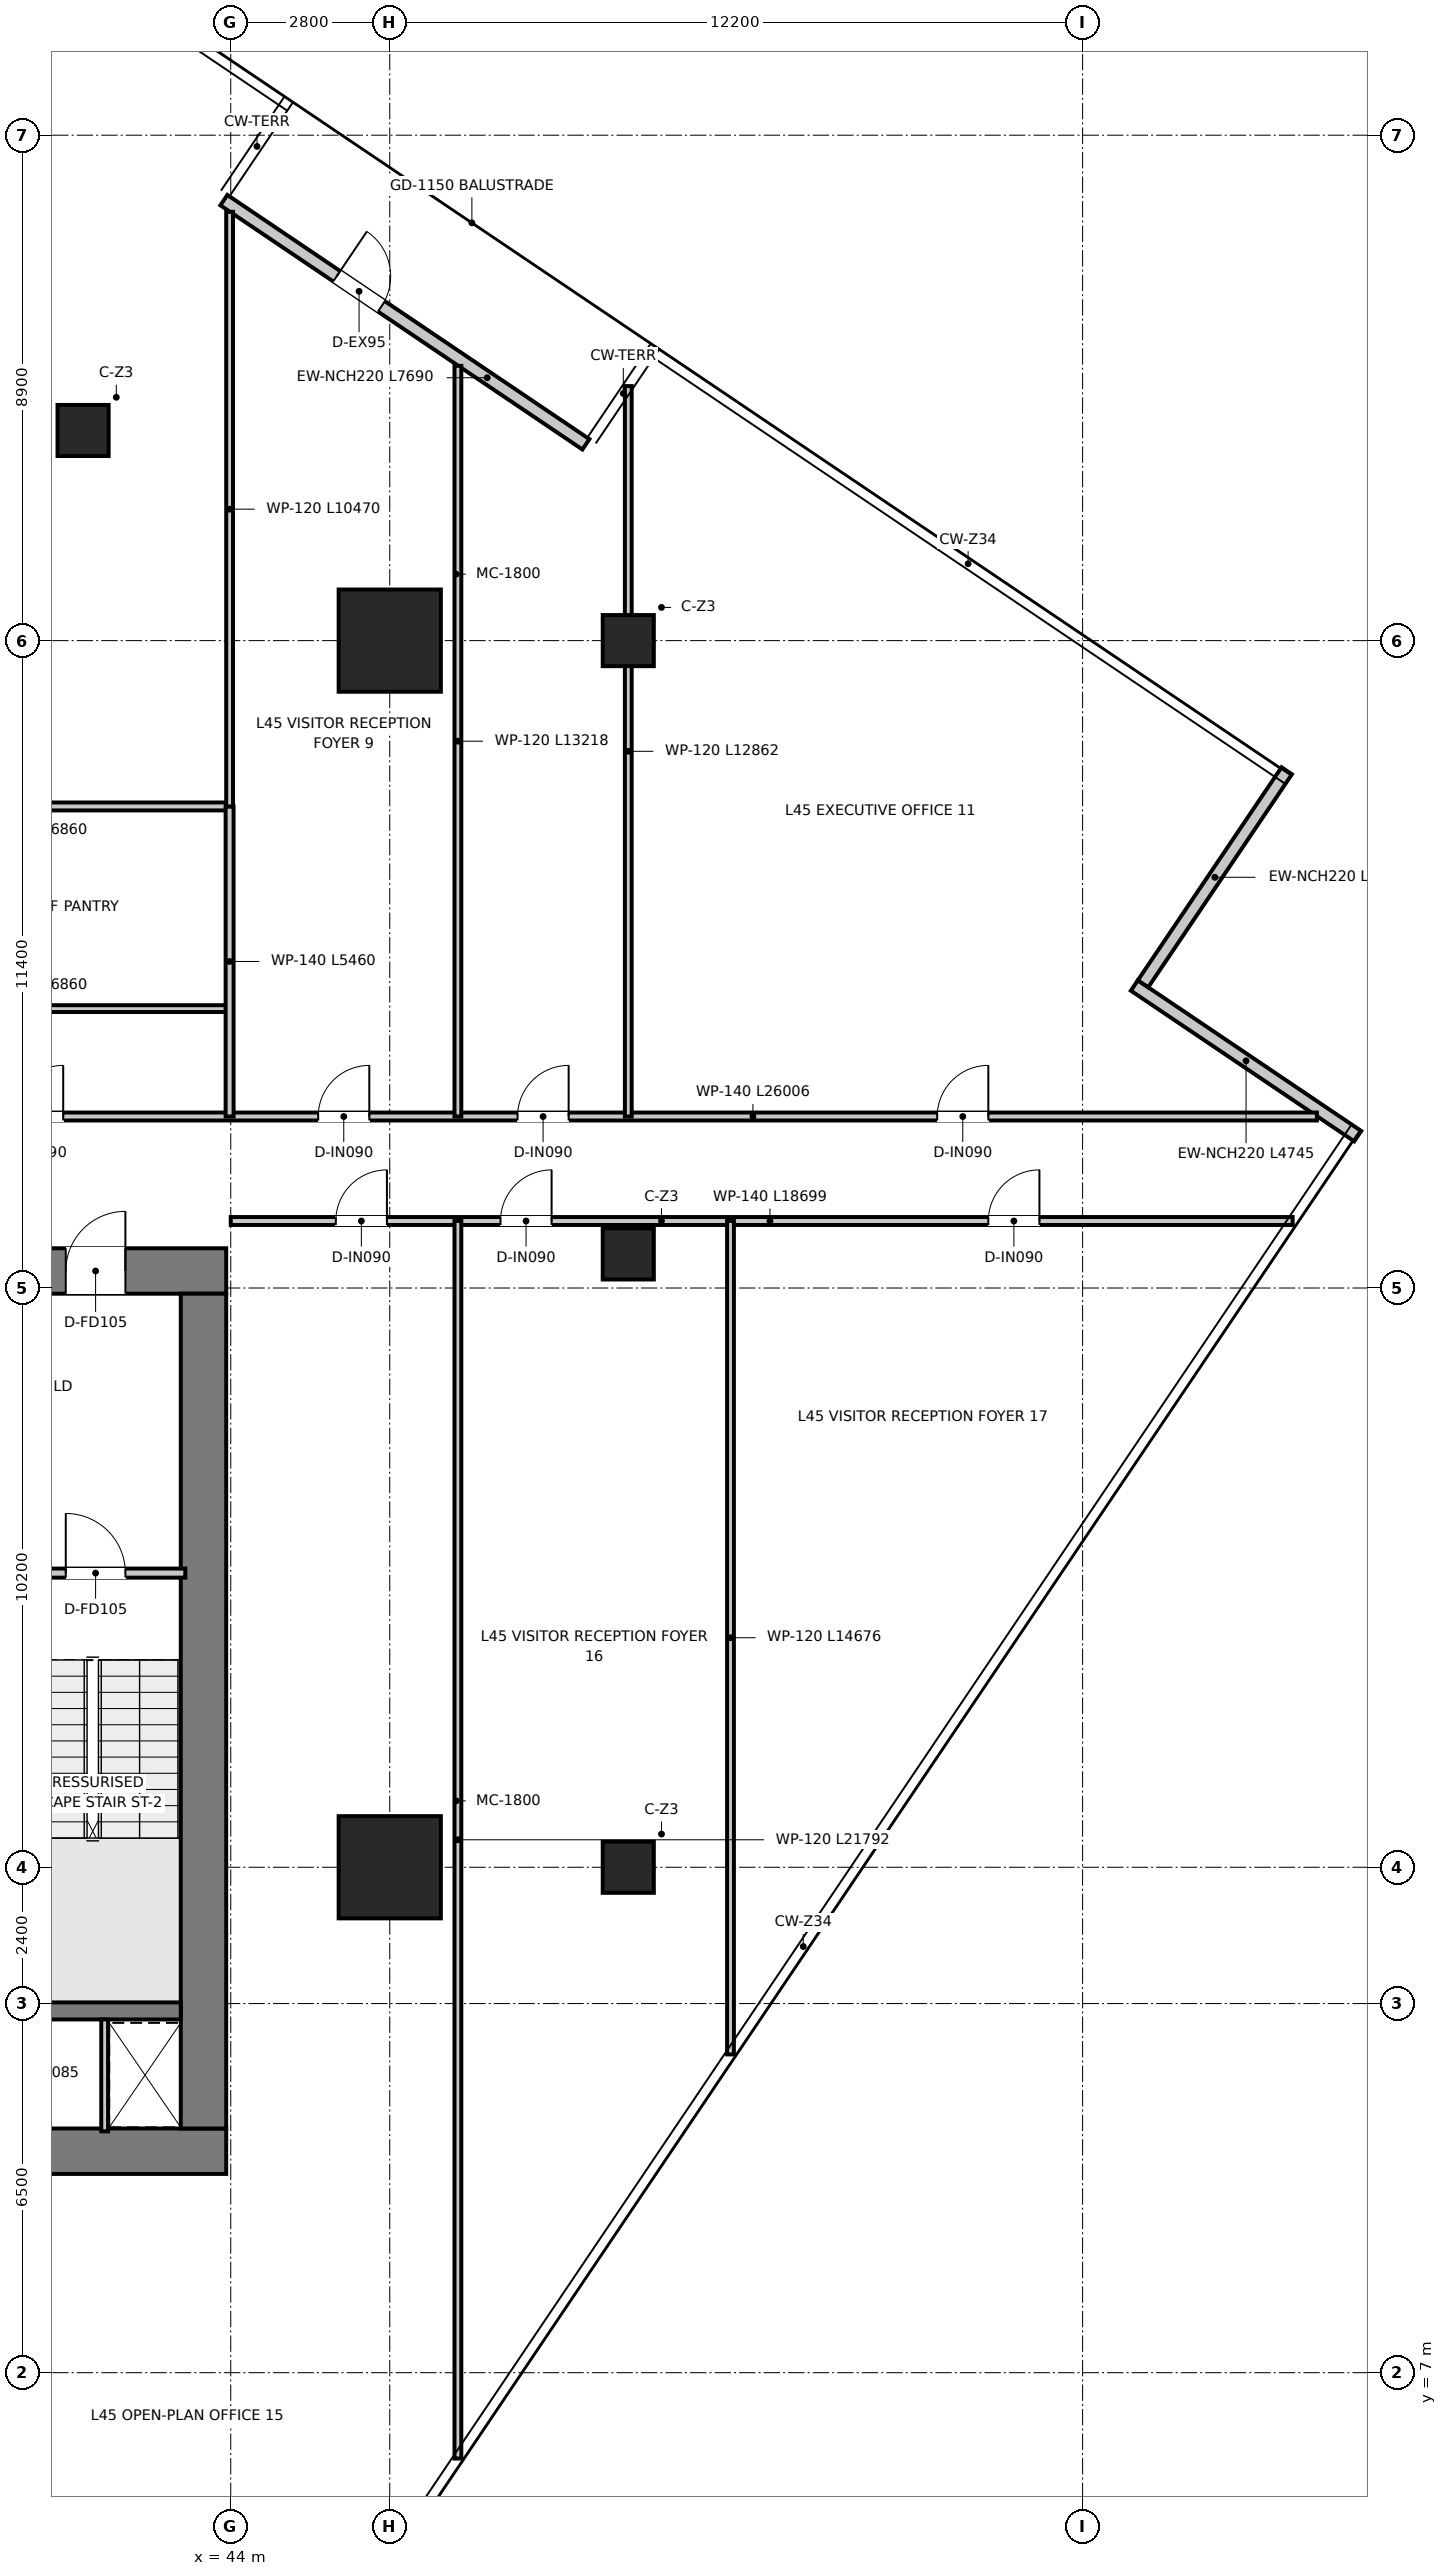
"""IFC4 building model, lengths in metres.
Left out: names, types, materials, properties, quantities, classifications, styles, units other than length and angle.
Written with IfcOpenShell. Run it as: python <this file> out.ifc"""

import sys

from ifc_helpers import new_model, si_unit, direction, frame, frame_2d, origin, origin_2d, place, context, subcontext, project, spatial, rectangle, extrude, source, transform, mapped, element, fill, save


model = new_model("IFC4")
c1 = context("Model", 3, precision=1e-05, world=origin(), true_north=direction((0.0, 1.0)))
c2 = subcontext(c1, "Body", "Model", "MODEL_VIEW")
j1 = project(units=[si_unit("LENGTHUNIT", "METRE"), si_unit("PLANEANGLEUNIT", "RADIAN")], contexts=[c1])
p1 = place(None, origin())
s1 = spatial("IfcSite", under=j1, at=p1, CompositionType="ELEMENT")
p2 = place(p1, origin())
s2 = spatial("IfcBuilding", under=s1, at=p2, CompositionType="ELEMENT")
p3 = place(p2, frame((0.0, 0.0, 185.7)))
s3 = spatial("IfcBuildingStorey", under=s2, at=p3, CompositionType="ELEMENT", Elevation=185.7)
p4 = place(p3, frame((28.08, 10.9, 0.0), z_axis=(0.0, 0.0, 1.0), x_axis=(1.0, 0.0, 0.0)))
e1 = element("IfcWall", 1, at=p4, inside=s3, PredefinedType="SHEAR", context=c2, shape_type="SweptSolid", body=[
    extrude(rectangle(XDim=15.84, YDim=0.8, at=frame_2d((7.92, 0.0))), origin(), (0.0, 0.0, 1.0), 3.95),
])
p5 = place(p3, frame((28.08, 26.4, 0.0), z_axis=(0.0, 0.0, 1.0), x_axis=(1.0, 0.0, 0.0)))
e2 = element("IfcWall", 2, at=p5, inside=s3, PredefinedType="SHEAR", context=c2, shape_type="SweptSolid", body=[
    extrude(rectangle(XDim=15.84, YDim=0.8, at=frame_2d((7.92, 0.0))), origin(), (0.0, 0.0, 1.0), 3.95),
])
p6 = place(p5, frame((7.22, 0.0, 0.0)))
e3 = element("IfcOpeningElement", 3, at=p6, cuts=e2, PredefinedType="OPENING", context=c2, shape_type="SweptSolid", body=[
    extrude(rectangle(XDim=1.4, YDim=2.2, at=frame_2d((0.7, 1.1))), frame((0.0, 0.41, 0.0), z_axis=(0.0, -1.0, 0.0), x_axis=(1.0, 0.0, 0.0)), (0.0, 0.0, 1.0), 0.82),
])
p7 = place(p5, frame((1.775, 0.0, 0.0)))
e4 = element("IfcOpeningElement", 4, at=p7, cuts=e2, PredefinedType="OPENING", context=c2, shape_type="SweptSolid", body=[
    extrude(rectangle(XDim=1.05, YDim=2.1, at=frame_2d((0.525, 1.05))), frame((0.0, 0.41, 0.0), z_axis=(0.0, -1.0, 0.0), x_axis=(1.0, 0.0, 0.0)), (0.0, 0.0, 1.0), 0.82),
])
p8 = place(p5, frame((13.015, 0.0, 0.0)))
e5 = element("IfcOpeningElement", 5, at=p8, cuts=e2, PredefinedType="OPENING", context=c2, shape_type="SweptSolid", body=[
    extrude(rectangle(XDim=1.05, YDim=2.1, at=frame_2d((0.525, 1.05))), frame((0.0, 0.41, 0.0), z_axis=(0.0, -1.0, 0.0), x_axis=(1.0, 0.0, 0.0)), (0.0, 0.0, 1.0), 0.82),
])
p9 = place(p3, frame((43.52, 11.3, 0.0), z_axis=(0.0, 0.0, 1.0), x_axis=(0.0, 1.0, 0.0)))
e6 = element("IfcWall", 6, at=p9, inside=s3, PredefinedType="SHEAR", context=c2, shape_type="SweptSolid", body=[
    extrude(rectangle(XDim=14.7, YDim=0.8, at=frame_2d((7.35, 0.0))), origin(), (0.0, 0.0, 1.0), 3.95),
])
p10 = place(p3, frame((40.02, 13.37, 0.0), z_axis=(0.0, 0.0, 1.0), x_axis=(1.0, 0.0, 0.0)))
e7 = element("IfcWall", 7, at=p10, inside=s3, PredefinedType="SHEAR", context=c2, shape_type="SweptSolid", body=[
    extrude(rectangle(XDim=3.1, YDim=0.3, at=frame_2d((1.55, 0.0))), origin(), (0.0, 0.0, 1.0), 3.95),
])
m1 = source(origin(), c2, "Body", "SweptSolid", [
    extrude(rectangle(XDim=1.8, YDim=1.8, at=origin_2d()), origin(), (0.0, 0.0, 1.0), 3.95),
])
for number, where, z_axis, x_axis in (
    (8, (46.8, 15.9, 0.0), (0.0, 0.0, 1.0), (1.0, 0.0, 0.0)),
    (9, (46.8, 37.5, 0.0), (0.0, 0.0, 1.0), (1.0, 0.0, 0.0)),
):
    element("IfcColumn", number, at=place(p3, frame(where, z_axis=z_axis, x_axis=x_axis)), inside=s3, PredefinedType="USERDEFINED", context=c2, shape_type="MappedRepresentation", body=[
        mapped(m1, transform((0.0, 0.0, 0.0), x_axis=(1.0, 0.0, 0.0), y_axis=(0.0, 1.0, 0.0), z_axis=(0.0, 0.0, 1.0), scale=1.0)),
    ])
m2 = source(origin(), c2, "Body", "SweptSolid", [
    extrude(rectangle(XDim=0.9, YDim=0.9, at=origin_2d()), origin(), (0.0, 0.0, 1.0), 3.95),
])
for number, where, z_axis, x_axis in (
    (10, (41.4, 41.2, 0.0), (0.0, 0.0, 1.0), (1.0, 0.0, 0.0)),
    (11, (51.0, 37.5, 0.0), (0.0, 0.0, 1.0), (1.0, 0.0, 0.0)),
    (12, (51.0, 26.7, 0.0), (0.0, 0.0, 1.0), (1.0, 0.0, 0.0)),
    (13, (51.0, 15.9, 0.0), (0.0, 0.0, 1.0), (1.0, 0.0, 0.0)),
):
    element("IfcColumn", number, at=place(p3, frame(where, z_axis=z_axis, x_axis=x_axis)), inside=s3, PredefinedType="COLUMN", context=c2, shape_type="MappedRepresentation", body=[
        mapped(m2, transform((0.0, 0.0, 0.0), x_axis=(1.0, 0.0, 0.0), y_axis=(0.0, 1.0, 0.0), z_axis=(0.0, 0.0, 1.0), scale=1.0)),
    ])
p11 = place(p3, frame((63.845, 28.774, 0.0), z_axis=(0.0, 0.0, 1.0), x_axis=(-0.829006114382, 0.559239539301, 0.0)))
e14 = element("IfcWall", 14, at=p11, inside=s3, PredefinedType="ELEMENTEDWALL", context=c2, shape_type="SweptSolid", body=[
    extrude(rectangle(XDim=4.745, YDim=0.22, at=frame_2d((2.373, 0.0))), origin(), (0.0, 0.0, 1.0), 3.67),
])
p12 = place(p3, frame((60.064, 31.457, 0.0), z_axis=(0.0, 0.0, 1.0), x_axis=(0.559211522982, 0.829025013232, 0.0)))
e15 = element("IfcWall", 15, at=p12, inside=s3, PredefinedType="ELEMENTEDWALL", context=c2, shape_type="SweptSolid", body=[
    extrude(rectangle(XDim=4.525, YDim=0.22, at=frame_2d((2.263, 0.0))), origin(), (0.0, 0.0, 1.0), 3.67),
])
p13 = place(p3, frame((43.879, 45.257, 0.0), z_axis=(0.0, 0.0, 1.0), x_axis=(0.829039271094, -0.559190385274, 0.0)))
e16 = element("IfcWall", 16, at=p13, inside=s3, PredefinedType="ELEMENTEDWALL", context=c2, shape_type="SweptSolid", body=[
    extrude(rectangle(XDim=7.69, YDim=0.22, at=frame_2d((3.845, 0.0))), origin(), (0.0, 0.0, 1.0), 3.67),
])
p14 = place(p13, frame((2.397, 0.0, 0.0)))
e17 = element("IfcOpeningElement", 17, at=p14, cuts=e16, PredefinedType="OPENING", context=c2, shape_type="SweptSolid", body=[
    extrude(rectangle(XDim=0.95, YDim=2.1, at=frame_2d((0.475, 1.05))), frame((0.0, 0.12, 0.0), z_axis=(0.0, -1.0, 0.0), x_axis=(1.0, 0.0, 0.0)), (0.0, 0.0, 1.0), 0.24),
])
p15 = place(p3, frame((40.04, 21.08, 0.0), z_axis=(0.0, 0.0, 1.0), x_axis=(1.0, 0.0, 0.0)))
e18 = element("IfcWall", 18, at=p15, inside=s3, PredefinedType="PARTITIONING", context=c2, shape_type="SweptSolid", body=[
    extrude(rectangle(XDim=3.16, YDim=0.16, at=frame_2d((1.58, 0.0))), origin(), (0.0, 0.0, 1.0), 3.67),
])
p16 = place(p15, frame((1.055, 0.0, 0.0)))
e19 = element("IfcOpeningElement", 19, at=p16, cuts=e18, PredefinedType="OPENING", context=c2, shape_type="SweptSolid", body=[
    extrude(rectangle(XDim=1.05, YDim=2.1, at=frame_2d((0.525, 1.05))), frame((0.0, 0.09, 0.0), z_axis=(0.0, -1.0, 0.0), x_axis=(1.0, 0.0, 0.0)), (0.0, 0.0, 1.0), 0.18),
])
p17 = place(p3, frame((41.78, 11.25, 0.0), z_axis=(0.0, 0.0, 1.0), x_axis=(0.0, 1.0, 0.0)))
e20 = element("IfcWall", 20, at=p17, inside=s3, PredefinedType="PARTITIONING", context=c2, shape_type="SweptSolid", body=[
    extrude(rectangle(XDim=1.97, YDim=0.12, at=frame_2d((0.985, 0.0))), origin(), (0.0, 0.0, 1.0), 3.67),
])
p18 = place(p3, frame((37.12, 29.12, 0.0), z_axis=(0.0, 0.0, 1.0), x_axis=(1.0, 0.0, 0.0)))
e21 = element("IfcWall", 21, at=p18, inside=s3, PredefinedType="PARTITIONING", context=c2, shape_type="SweptSolid", body=[
    extrude(rectangle(XDim=26.006, YDim=0.14, at=frame_2d((13.003, 0.0))), origin(), (0.0, 0.0, 1.0), 3.03),
])
p19 = place(p18, frame((3.03, 0.0, 0.0)))
e22 = element("IfcOpeningElement", 22, at=p19, cuts=e21, PredefinedType="OPENING", context=c2, shape_type="SweptSolid", body=[
    extrude(rectangle(XDim=0.9, YDim=2.1, at=frame_2d((0.45, 1.05))), frame((0.0, 0.08, 0.0), z_axis=(0.0, -1.0, 0.0), x_axis=(1.0, 0.0, 0.0)), (0.0, 0.0, 1.0), 0.16),
])
p20 = place(p18, frame((8.42, 0.0, 0.0)))
e23 = element("IfcOpeningElement", 23, at=p20, cuts=e21, PredefinedType="OPENING", context=c2, shape_type="SweptSolid", body=[
    extrude(rectangle(XDim=0.9, YDim=2.1, at=frame_2d((0.45, 1.05))), frame((0.0, 0.08, 0.0), z_axis=(0.0, -1.0, 0.0), x_axis=(1.0, 0.0, 0.0)), (0.0, 0.0, 1.0), 0.16),
])
p21 = place(p18, frame((11.93, 0.0, 0.0)))
e24 = element("IfcOpeningElement", 24, at=p21, cuts=e21, PredefinedType="OPENING", context=c2, shape_type="SweptSolid", body=[
    extrude(rectangle(XDim=0.9, YDim=2.1, at=frame_2d((0.45, 1.05))), frame((0.0, 0.08, 0.0), z_axis=(0.0, -1.0, 0.0), x_axis=(1.0, 0.0, 0.0)), (0.0, 0.0, 1.0), 0.16),
])
p22 = place(p18, frame((19.32, 0.0, 0.0)))
e25 = element("IfcOpeningElement", 25, at=p22, cuts=e21, PredefinedType="OPENING", context=c2, shape_type="SweptSolid", body=[
    extrude(rectangle(XDim=0.9, YDim=2.1, at=frame_2d((0.45, 1.05))), frame((0.0, 0.08, 0.0), z_axis=(0.0, -1.0, 0.0), x_axis=(1.0, 0.0, 0.0)), (0.0, 0.0, 1.0), 0.16),
])
p23 = place(p3, frame((44.0, 27.28, 0.0), z_axis=(0.0, 0.0, 1.0), x_axis=(1.0, 0.0, 0.0)))
e26 = element("IfcWall", 26, at=p23, inside=s3, PredefinedType="PARTITIONING", context=c2, shape_type="SweptSolid", body=[
    extrude(rectangle(XDim=18.699, YDim=0.14, at=frame_2d((9.349, 0.0))), origin(), (0.0, 0.0, 1.0), 3.03),
])
p24 = place(p23, frame((1.85, 0.0, 0.0)))
e27 = element("IfcOpeningElement", 27, at=p24, cuts=e26, PredefinedType="OPENING", context=c2, shape_type="SweptSolid", body=[
    extrude(rectangle(XDim=0.9, YDim=2.1, at=frame_2d((0.45, 1.05))), frame((0.0, 0.08, 0.0), z_axis=(0.0, -1.0, 0.0), x_axis=(1.0, 0.0, 0.0)), (0.0, 0.0, 1.0), 0.16),
])
p25 = place(p23, frame((4.75, 0.0, 0.0)))
e28 = element("IfcOpeningElement", 28, at=p25, cuts=e26, PredefinedType="OPENING", context=c2, shape_type="SweptSolid", body=[
    extrude(rectangle(XDim=0.9, YDim=2.1, at=frame_2d((0.45, 1.05))), frame((0.0, 0.08, 0.0), z_axis=(0.0, -1.0, 0.0), x_axis=(1.0, 0.0, 0.0)), (0.0, 0.0, 1.0), 0.16),
])
p26 = place(p23, frame((13.34, 0.0, 0.0)))
e29 = element("IfcOpeningElement", 29, at=p26, cuts=e26, PredefinedType="OPENING", context=c2, shape_type="SweptSolid", body=[
    extrude(rectangle(XDim=0.9, YDim=2.1, at=frame_2d((0.45, 1.05))), frame((0.0, 0.08, 0.0), z_axis=(0.0, -1.0, 0.0), x_axis=(1.0, 0.0, 0.0)), (0.0, 0.0, 1.0), 0.16),
])
p27 = place(p3, frame((37.12, 31.02, 0.0), z_axis=(0.0, 0.0, 1.0), x_axis=(1.0, 0.0, 0.0)))
e30 = element("IfcWall", 30, at=p27, inside=s3, PredefinedType="PARTITIONING", context=c2, shape_type="SweptSolid", body=[
    extrude(rectangle(XDim=6.86, YDim=0.12, at=frame_2d((3.43, 0.0))), origin(), (0.0, 0.0, 1.0), 3.08),
])
p28 = place(p3, frame((37.12, 34.58, 0.0), z_axis=(0.0, 0.0, 1.0), x_axis=(1.0, 0.0, 0.0)))
e31 = element("IfcWall", 31, at=p28, inside=s3, PredefinedType="PARTITIONING", context=c2, shape_type="SweptSolid", body=[
    extrude(rectangle(XDim=6.86, YDim=0.14, at=frame_2d((3.43, 0.0))), origin(), (0.0, 0.0, 1.0), 3.08),
])
p29 = place(p3, frame((43.98, 29.12, 0.0), z_axis=(0.0, 0.0, 1.0), x_axis=(0.0, 1.0, 0.0)))
e32 = element("IfcWall", 32, at=p29, inside=s3, PredefinedType="PARTITIONING", context=c2, shape_type="SweptSolid", body=[
    extrude(rectangle(XDim=5.46, YDim=0.14, at=frame_2d((2.73, 0.0))), origin(), (0.0, 0.0, 1.0), 3.31),
])
p30 = place(p3, frame((43.98, 34.58, 0.0), z_axis=(0.0, 0.0, 1.0), x_axis=(0.0, 1.0, 0.0)))
e33 = element("IfcWall", 33, at=p30, inside=s3, PredefinedType="PARTITIONING", context=c2, shape_type="SweptSolid", body=[
    extrude(rectangle(XDim=10.47, YDim=0.12, at=frame_2d((5.235, 0.0))), origin(), (0.0, 0.0, 1.0), 3.03),
])
p31 = place(p3, frame((48.0, 29.12, 0.0), z_axis=(0.0, 0.0, 1.0), x_axis=(0.0, 1.0, 0.0)))
e34 = element("IfcWall", 34, at=p31, inside=s3, PredefinedType="PARTITIONING", context=c2, shape_type="SweptSolid", body=[
    extrude(rectangle(XDim=13.218, YDim=0.12, at=frame_2d((6.609, 0.0))), origin(), (0.0, 0.0, 1.0), 3.08),
])
p32 = place(p3, frame((51.0, 29.12, 0.0), z_axis=(0.0, 0.0, 1.0), x_axis=(0.0, 1.0, 0.0)))
e35 = element("IfcWall", 35, at=p32, inside=s3, PredefinedType="PARTITIONING", context=c2, shape_type="SweptSolid", body=[
    extrude(rectangle(XDim=12.862, YDim=0.12, at=frame_2d((6.431, 0.0))), origin(), (0.0, 0.0, 1.0), 3.08),
])
p33 = place(p3, frame((48.0, 5.488, 0.0), z_axis=(0.0, 0.0, 1.0), x_axis=(0.0, 1.0, 0.0)))
e36 = element("IfcWall", 36, at=p33, inside=s3, PredefinedType="PARTITIONING", context=c2, shape_type="SweptSolid", body=[
    extrude(rectangle(XDim=21.792, YDim=0.12, at=frame_2d((10.896, 0.0))), origin(), (0.0, 0.0, 1.0), 3.08),
])
p34 = place(p3, frame((52.8, 12.604, 0.0), z_axis=(0.0, 0.0, 1.0), x_axis=(0.0, 1.0, 0.0)))
e37 = element("IfcWall", 37, at=p34, inside=s3, PredefinedType="PARTITIONING", context=c2, shape_type="SweptSolid", body=[
    extrude(rectangle(XDim=14.676, YDim=0.12, at=frame_2d((7.338, 0.0))), origin(), (0.0, 0.0, 1.0), 3.67),
])
p35 = place(p16, origin())
e38 = element("IfcDoor", 38, at=p35, inside=s3, OperationType="SINGLE_SWING_LEFT", PredefinedType="DOOR", context=c2, shape_type="SweptSolid", body=[
    extrude(rectangle(XDim=1.05, YDim=2.1, at=frame_2d((0.525, 1.05))), frame((0.0, 0.025, 0.0), z_axis=(0.0, -1.0, 0.0), x_axis=(1.0, 0.0, 0.0)), (0.0, 0.0, 1.0), 0.05),
])
fill(e19, e38)
p36 = place(p8, origin())
e39 = element("IfcDoor", 39, at=p36, inside=s3, OperationType="SINGLE_SWING_RIGHT", PredefinedType="DOOR", context=c2, shape_type="SweptSolid", body=[
    extrude(rectangle(XDim=1.05, YDim=2.1, at=frame_2d((0.525, 1.05))), frame((0.0, 0.025, 0.0), z_axis=(0.0, -1.0, 0.0), x_axis=(1.0, 0.0, 0.0)), (0.0, 0.0, 1.0), 0.05),
])
fill(e5, e39)
p37 = place(p19, origin())
e40 = element("IfcDoor", 40, at=p37, inside=s3, OperationType="SINGLE_SWING_RIGHT", PredefinedType="DOOR", context=c2, shape_type="SweptSolid", body=[
    extrude(rectangle(XDim=0.9, YDim=2.1, at=frame_2d((0.45, 1.05))), frame((0.0, 0.025, 0.0), z_axis=(0.0, -1.0, 0.0), x_axis=(1.0, 0.0, 0.0)), (0.0, 0.0, 1.0), 0.05),
])
fill(e22, e40)
p38 = place(p20, origin())
e41 = element("IfcDoor", 41, at=p38, inside=s3, OperationType="SINGLE_SWING_RIGHT", PredefinedType="DOOR", context=c2, shape_type="SweptSolid", body=[
    extrude(rectangle(XDim=0.9, YDim=2.1, at=frame_2d((0.45, 1.05))), frame((0.0, 0.025, 0.0), z_axis=(0.0, -1.0, 0.0), x_axis=(1.0, 0.0, 0.0)), (0.0, 0.0, 1.0), 0.05),
])
fill(e23, e41)
p39 = place(p21, origin())
e42 = element("IfcDoor", 42, at=p39, inside=s3, OperationType="SINGLE_SWING_RIGHT", PredefinedType="DOOR", context=c2, shape_type="SweptSolid", body=[
    extrude(rectangle(XDim=0.9, YDim=2.1, at=frame_2d((0.45, 1.05))), frame((0.0, 0.025, 0.0), z_axis=(0.0, -1.0, 0.0), x_axis=(1.0, 0.0, 0.0)), (0.0, 0.0, 1.0), 0.05),
])
fill(e24, e42)
p40 = place(p22, origin())
e43 = element("IfcDoor", 43, at=p40, inside=s3, OperationType="SINGLE_SWING_RIGHT", PredefinedType="DOOR", context=c2, shape_type="SweptSolid", body=[
    extrude(rectangle(XDim=0.9, YDim=2.1, at=frame_2d((0.45, 1.05))), frame((0.0, 0.025, 0.0), z_axis=(0.0, -1.0, 0.0), x_axis=(1.0, 0.0, 0.0)), (0.0, 0.0, 1.0), 0.05),
])
fill(e25, e43)
p41 = place(p24, origin())
e44 = element("IfcDoor", 44, at=p41, inside=s3, OperationType="SINGLE_SWING_RIGHT", PredefinedType="DOOR", context=c2, shape_type="SweptSolid", body=[
    extrude(rectangle(XDim=0.9, YDim=2.1, at=frame_2d((0.45, 1.05))), frame((0.0, 0.025, 0.0), z_axis=(0.0, -1.0, 0.0), x_axis=(1.0, 0.0, 0.0)), (0.0, 0.0, 1.0), 0.05),
])
fill(e27, e44)
p42 = place(p25, origin())
e45 = element("IfcDoor", 45, at=p42, inside=s3, OperationType="SINGLE_SWING_RIGHT", PredefinedType="DOOR", context=c2, shape_type="SweptSolid", body=[
    extrude(rectangle(XDim=0.9, YDim=2.1, at=frame_2d((0.45, 1.05))), frame((0.0, 0.025, 0.0), z_axis=(0.0, -1.0, 0.0), x_axis=(1.0, 0.0, 0.0)), (0.0, 0.0, 1.0), 0.05),
])
fill(e28, e45)
p43 = place(p26, origin())
e46 = element("IfcDoor", 46, at=p43, inside=s3, OperationType="SINGLE_SWING_RIGHT", PredefinedType="DOOR", context=c2, shape_type="SweptSolid", body=[
    extrude(rectangle(XDim=0.9, YDim=2.1, at=frame_2d((0.45, 1.05))), frame((0.0, 0.025, 0.0), z_axis=(0.0, -1.0, 0.0), x_axis=(1.0, 0.0, 0.0)), (0.0, 0.0, 1.0), 0.05),
])
fill(e29, e46)
p44 = place(p14, origin())
e47 = element("IfcDoor", 47, at=p44, inside=s3, OperationType="SINGLE_SWING_LEFT", PredefinedType="DOOR", context=c2, shape_type="SweptSolid", body=[
    extrude(rectangle(XDim=0.95, YDim=2.1, at=frame_2d((0.475, 1.05))), frame((0.0, 0.025, 0.0), z_axis=(0.0, -1.0, 0.0), x_axis=(1.0, 0.0, 0.0)), (0.0, 0.0, 1.0), 0.05),
])
fill(e17, e47)
save(model, sys.argv[1])
